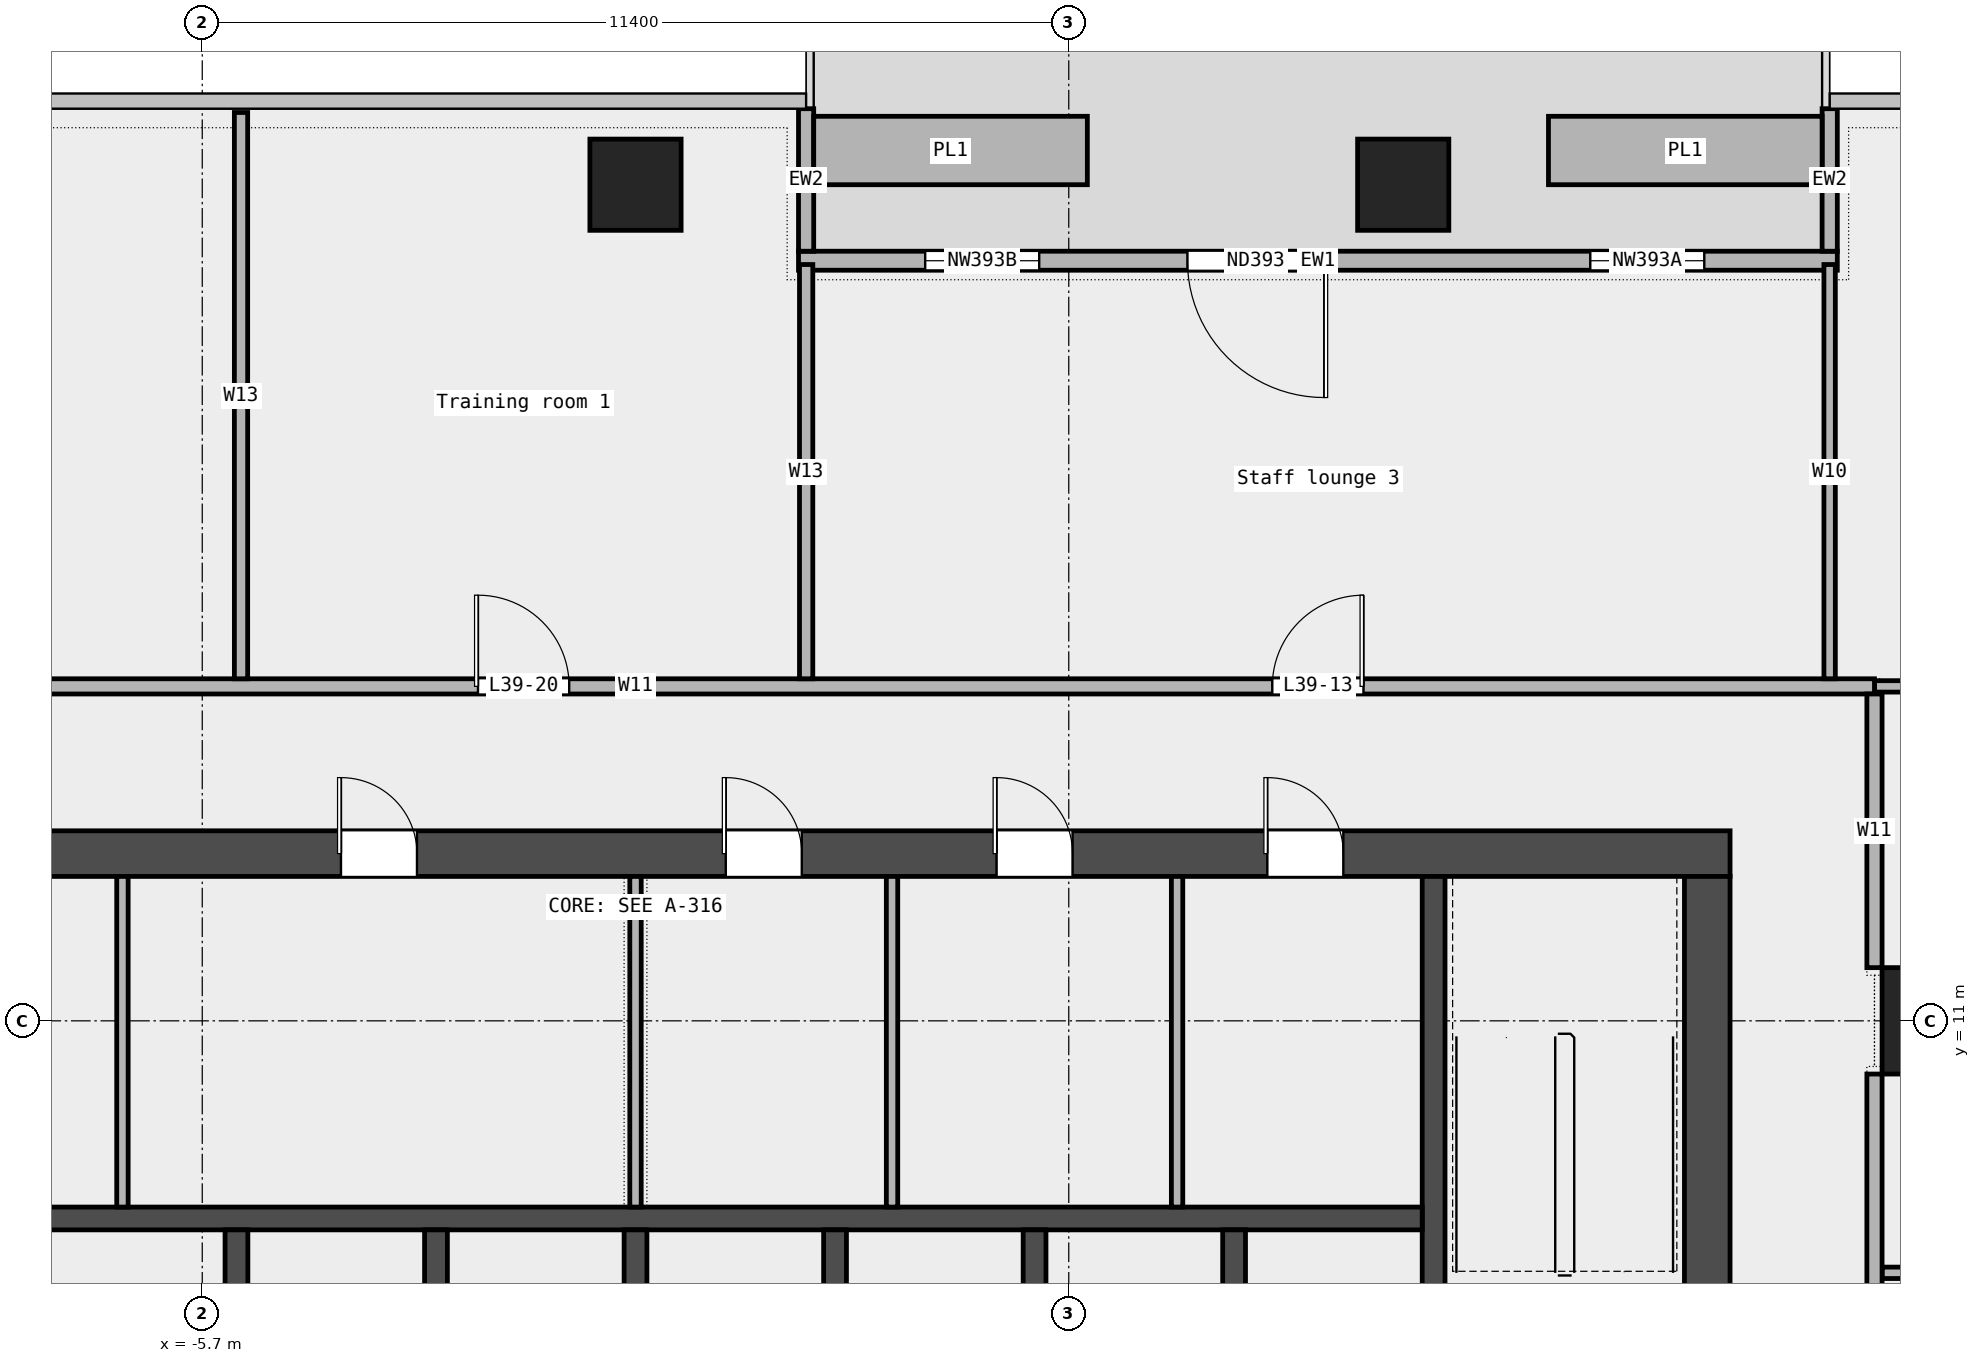
"""IFC4 building model, lengths in metres.
Left out: names, types, materials, properties, quantities, classifications, styles, units other than length and angle.
Written with IfcOpenShell. Run it as: python <this file> out.ifc"""

import sys

from ifc_helpers import new_model, si_unit, direction, frame, frame_2d, origin, origin_2d, place, context, subcontext, project, spatial, rectangle, extrude, element, fill, save


model = new_model("IFC4")
c1 = context("Model", 3, precision=1e-05, world=origin(), true_north=direction((0.0, 1.0)))
c2 = subcontext(c1, "Body", "Model", "MODEL_VIEW")
j1 = project(units=[si_unit("LENGTHUNIT", "METRE"), si_unit("PLANEANGLEUNIT", "RADIAN")], contexts=[c1])
p1 = place(None, origin())
s1 = spatial("IfcSite", under=j1, at=p1, CompositionType="ELEMENT")
p2 = place(p1, origin())
s2 = spatial("IfcBuilding", under=s1, at=p2, CompositionType="ELEMENT")
p3 = place(p2, frame((0.0, 0.0, 189.0)))
s3 = spatial("IfcBuildingStorey", under=s2, at=p3, CompositionType="ELEMENT", Elevation=189.0)
for number, where, z_axis, x_axis in (
    (1, (10.1, 22.0, 0.0), (0.0, 0.0, 1.0), (1.0, 0.0, 0.0)),
    (2, (0.0, 22.0, 0.0), (0.0, 0.0, 1.0), (1.0, 0.0, 0.0)),
):
    element("IfcColumn", number, at=place(p3, frame(where, z_axis=z_axis, x_axis=x_axis)), inside=s3, PredefinedType="COLUMN", context=c2, shape_type="SweptSolid", body=[
        extrude(rectangle(XDim=1.2, YDim=1.2, at=origin_2d()), origin(), (0.0, 0.0, 1.0), 3.6),
    ])
p4 = place(p3, frame((17.1, 11.0, 0.0), z_axis=(0.0, 0.0, 1.0), x_axis=(1.0, 0.0, 0.0)))
e3 = element("IfcColumn", 3, at=p4, inside=s3, PredefinedType="COLUMN", context=c2, shape_type="SweptSolid", body=[
    extrude(rectangle(XDim=1.4, YDim=1.4, at=origin_2d()), origin(), (0.0, 0.0, 1.0), 3.6),
])
p5 = place(p3, frame((15.811, 21.0, 0.0), z_axis=(0.0, 0.0, 1.0), x_axis=(-1.0, 0.0, 0.0)))
e4 = element("IfcWall", 4, at=p5, inside=s3, PredefinedType="STANDARD", context=c2, shape_type="SweptSolid", body=[
    extrude(rectangle(XDim=13.667, YDim=0.25, at=frame_2d((6.833, 0.0))), origin(), (0.0, 0.0, 1.0), 3.6),
])
p6 = place(p5, frame((1.75, 0.0, 0.45)))
e5 = element("IfcOpeningElement", 5, at=p6, cuts=e4, PredefinedType="OPENING", context=c2, shape_type="SweptSolid", body=[
    extrude(rectangle(XDim=1.5, YDim=2.4, at=frame_2d((0.75, 1.2))), frame((0.0, 0.137, 0.0), z_axis=(0.0, -1.0, 0.0), x_axis=(1.0, 0.0, 0.0)), (0.0, 0.0, 1.0), 0.274),
])
p7 = place(p5, frame((6.75, 0.0, 0.0)))
e6 = element("IfcOpeningElement", 6, at=p7, cuts=e4, PredefinedType="OPENING", context=c2, shape_type="SweptSolid", body=[
    extrude(rectangle(XDim=1.8, YDim=2.4, at=frame_2d((0.9, 1.2))), frame((0.0, 0.137, 0.0), z_axis=(0.0, -1.0, 0.0), x_axis=(1.0, 0.0, 0.0)), (0.0, 0.0, 1.0), 0.274),
])
p8 = place(p5, frame((10.5, 0.0, 0.45)))
e7 = element("IfcOpeningElement", 7, at=p8, cuts=e4, PredefinedType="OPENING", context=c2, shape_type="SweptSolid", body=[
    extrude(rectangle(XDim=1.5, YDim=2.4, at=frame_2d((0.75, 1.2))), frame((0.0, 0.137, 0.0), z_axis=(0.0, -1.0, 0.0), x_axis=(1.0, 0.0, 0.0)), (0.0, 0.0, 1.0), 0.274),
])
for number, where, z_axis, x_axis in (
    (8, (15.711, 23.0, 0.0), (0.0, 0.0, 1.0), (0.0, -1.0, 0.0)),
    (9, (2.244, 23.0, 0.0), (0.0, 0.0, 1.0), (0.0, -1.0, 0.0)),
):
    element("IfcWall", number, at=place(p3, frame(where, z_axis=z_axis, x_axis=x_axis)), inside=s3, PredefinedType="STANDARD", context=c2, shape_type="SweptSolid", body=[
        extrude(rectangle(XDim=1.875, YDim=0.2, at=frame_2d((0.938, 0.0))), origin(), (0.0, 0.0, 1.0), 3.6),
    ])
for number, where, z_axis, x_axis in (
    (10, (15.611, 22.45, 0.0), (0.0, 0.0, 1.0), (-1.0, 0.0, 0.0)),
    (11, (5.944, 22.45, 0.0), (0.0, 0.0, 1.0), (-1.0, 0.0, 0.0)),
):
    element("IfcWall", number, at=place(p3, frame(where, z_axis=z_axis, x_axis=x_axis)), inside=s3, PredefinedType="STANDARD", context=c2, shape_type="SweptSolid", body=[
        extrude(rectangle(XDim=3.6, YDim=0.9, at=frame_2d((1.8, 0.0))), origin(), (0.0, 0.0, 1.0), 0.7),
    ])
p9 = place(p3, frame((16.4, 7.685, 0.0), z_axis=(0.0, 0.0, 1.0), x_axis=(1.0, 0.0, 0.0)))
e12 = element("IfcWall", 12, at=p9, inside=s3, PredefinedType="PARTITIONING", context=c2, shape_type="SweptSolid", body=[
    extrude(rectangle(XDim=3.4, YDim=0.15, at=frame_2d((1.7, 0.0))), origin(), (0.0, 0.0, 1.0), 3.6),
])
p10 = place(p3, frame((16.3, 15.4, 0.0), z_axis=(0.0, 0.0, 1.0), x_axis=(1.0, 0.0, 0.0)))
e13 = element("IfcWall", 13, at=p10, inside=s3, PredefinedType="PARTITIONING", context=c2, shape_type="SweptSolid", body=[
    extrude(rectangle(XDim=3.6, YDim=0.15, at=frame_2d((1.8, 0.0))), origin(), (0.0, 0.0, 1.0), 3.6),
])
p11 = place(p3, frame((-16.3, 15.4, 0.0), z_axis=(0.0, 0.0, 1.0), x_axis=(1.0, 0.0, 0.0)))
e14 = element("IfcWall", 14, at=p11, inside=s3, PredefinedType="PARTITIONING", context=c2, shape_type="SweptSolid", body=[
    extrude(rectangle(XDim=32.6, YDim=0.2, at=frame_2d((16.3, 0.0))), origin(), (0.0, 0.0, 1.0), 3.6),
])
p12 = place(p11, frame((24.677, 0.0, 0.0)))
e15 = element("IfcOpeningElement", 15, at=p12, cuts=e14, PredefinedType="OPENING", context=c2, shape_type="SweptSolid", body=[
    extrude(rectangle(XDim=1.2, YDim=2.1, at=frame_2d((0.6, 1.05))), frame((0.0, 0.112, 0.0), z_axis=(0.0, -1.0, 0.0), x_axis=(1.0, 0.0, 0.0)), (0.0, 0.0, 1.0), 0.224),
])
p13 = place(p11, frame((4.805, 0.0, 0.0)))
e16 = element("IfcOpeningElement", 16, at=p13, cuts=e14, PredefinedType="OPENING", context=c2, shape_type="SweptSolid", body=[
    extrude(rectangle(XDim=1.5, YDim=2.1, at=frame_2d((0.75, 1.05))), frame((0.0, 0.112, 0.0), z_axis=(0.0, -1.0, 0.0), x_axis=(1.0, 0.0, 0.0)), (0.0, 0.0, 1.0), 0.224),
])
p14 = place(p11, frame((14.228, 0.0, 0.0)))
e17 = element("IfcOpeningElement", 17, at=p14, cuts=e14, PredefinedType="OPENING", context=c2, shape_type="SweptSolid", body=[
    extrude(rectangle(XDim=1.2, YDim=2.1, at=frame_2d((0.6, 1.05))), frame((0.0, 0.112, 0.0), z_axis=(0.0, -1.0, 0.0), x_axis=(1.0, 0.0, 0.0)), (0.0, 0.0, 1.0), 0.224),
])
p15 = place(p3, frame((-5.19, 15.5, 0.0), z_axis=(0.0, 0.0, 1.0), x_axis=(0.0, 1.0, 0.0)))
e18 = element("IfcWall", 18, at=p15, inside=s3, PredefinedType="PARTITIONING", context=c2, shape_type="SweptSolid", body=[
    extrude(rectangle(XDim=7.45, YDim=0.175, at=frame_2d((3.725, 0.0))), origin(), (0.0, 0.0, 1.0), 3.6),
])
p16 = place(p3, frame((2.245, 15.5, 0.0), z_axis=(0.0, 0.0, 1.0), x_axis=(0.0, 1.0, 0.0)))
e19 = element("IfcWall", 19, at=p16, inside=s3, PredefinedType="PARTITIONING", context=c2, shape_type="SweptSolid", body=[
    extrude(rectangle(XDim=5.45, YDim=0.175, at=frame_2d((2.725, 0.0))), origin(), (0.0, 0.0, 1.0), 3.6),
])
p17 = place(p3, frame((15.71, 15.5, 0.0), z_axis=(0.0, 0.0, 1.0), x_axis=(0.0, 1.0, 0.0)))
e20 = element("IfcWall", 20, at=p17, inside=s3, PredefinedType="PARTITIONING", context=c2, shape_type="SweptSolid", body=[
    extrude(rectangle(XDim=5.45, YDim=0.15, at=frame_2d((2.725, 0.0))), origin(), (0.0, 0.0, 1.0), 3.6),
])
p18 = place(p3, frame((16.3, 2.95, 0.0), z_axis=(0.0, 0.0, 1.0), x_axis=(0.0, 1.0, 0.0)))
e21 = element("IfcWall", 21, at=p18, inside=s3, PredefinedType="PARTITIONING", context=c2, shape_type="SweptSolid", body=[
    extrude(rectangle(XDim=7.35, YDim=0.2, at=frame_2d((3.675, 0.0))), origin(), (0.0, 0.0, 1.0), 3.6),
])
p19 = place(p3, frame((16.3, 11.7, 0.0), z_axis=(0.0, 0.0, 1.0), x_axis=(0.0, 1.0, 0.0)))
e22 = element("IfcWall", 22, at=p19, inside=s3, PredefinedType="PARTITIONING", context=c2, shape_type="SweptSolid", body=[
    extrude(rectangle(XDim=3.6, YDim=0.2, at=frame_2d((1.8, 0.0))), origin(), (0.0, 0.0, 1.0), 3.6),
])
p20 = place(p3, frame((-14.4, 13.2, 0.0), z_axis=(0.0, 0.0, 1.0), x_axis=(1.0, 0.0, 0.0)))
e23 = element("IfcWall", 23, at=p20, inside=s3, PredefinedType="SHEAR", context=c2, shape_type="SweptSolid", body=[
    extrude(rectangle(XDim=28.8, YDim=0.6, at=frame_2d((14.4, 0.0))), origin(), (0.0, 0.0, 1.0), 3.7),
])
p21 = place(p20, frame((5.275, 0.0, 0.0)))
e24 = element("IfcOpeningElement", 24, at=p21, cuts=e23, PredefinedType="OPENING", context=c2, shape_type="SweptSolid", body=[
    extrude(rectangle(XDim=1.0, YDim=2.1, at=frame_2d((0.5, 1.05))), frame((0.0, 0.312, 0.0), z_axis=(0.0, -1.0, 0.0), x_axis=(1.0, 0.0, 0.0)), (0.0, 0.0, 1.0), 0.624),
])
p22 = place(p20, frame((10.525, 0.0, 0.0)))
e25 = element("IfcOpeningElement", 25, at=p22, cuts=e23, PredefinedType="OPENING", context=c2, shape_type="SweptSolid", body=[
    extrude(rectangle(XDim=1.0, YDim=2.1, at=frame_2d((0.5, 1.05))), frame((0.0, 0.312, 0.0), z_axis=(0.0, -1.0, 0.0), x_axis=(1.0, 0.0, 0.0)), (0.0, 0.0, 1.0), 0.624),
])
p23 = place(p20, frame((15.587, 0.0, 0.0)))
e26 = element("IfcOpeningElement", 26, at=p23, cuts=e23, PredefinedType="OPENING", context=c2, shape_type="SweptSolid", body=[
    extrude(rectangle(XDim=1.0, YDim=2.1, at=frame_2d((0.5, 1.05))), frame((0.0, 0.312, 0.0), z_axis=(0.0, -1.0, 0.0), x_axis=(1.0, 0.0, 0.0)), (0.0, 0.0, 1.0), 0.624),
])
p24 = place(p20, frame((19.15, 0.0, 0.0)))
e27 = element("IfcOpeningElement", 27, at=p24, cuts=e23, PredefinedType="OPENING", context=c2, shape_type="SweptSolid", body=[
    extrude(rectangle(XDim=1.0, YDim=2.1, at=frame_2d((0.5, 1.05))), frame((0.0, 0.312, 0.0), z_axis=(0.0, -1.0, 0.0), x_axis=(1.0, 0.0, 0.0)), (0.0, 0.0, 1.0), 0.624),
])
p25 = place(p20, frame((22.712, 0.0, 0.0)))
e28 = element("IfcOpeningElement", 28, at=p25, cuts=e23, PredefinedType="OPENING", context=c2, shape_type="SweptSolid", body=[
    extrude(rectangle(XDim=1.0, YDim=2.1, at=frame_2d((0.5, 1.05))), frame((0.0, 0.312, 0.0), z_axis=(0.0, -1.0, 0.0), x_axis=(1.0, 0.0, 0.0)), (0.0, 0.0, 1.0), 0.624),
])
p26 = place(p3, frame((14.1, -6.6, 0.0), z_axis=(0.0, 0.0, 1.0), x_axis=(0.0, 1.0, 0.0)))
e29 = element("IfcWall", 29, at=p26, inside=s3, PredefinedType="SHEAR", context=c2, shape_type="SweptSolid", body=[
    extrude(rectangle(XDim=19.5, YDim=0.6, at=frame_2d((9.75, 0.0))), origin(), (0.0, 0.0, 1.0), 3.7),
])
p27 = place(p26, frame((9.3, 0.0, 0.0)))
e30 = element("IfcOpeningElement", 30, at=p27, cuts=e29, PredefinedType="OPENING", context=c2, shape_type="SweptSolid", body=[
    extrude(rectangle(XDim=1.8, YDim=2.1, at=frame_2d((0.9, 1.05))), frame((0.0, 0.312, 0.0), z_axis=(0.0, -1.0, 0.0), x_axis=(1.0, 0.0, 0.0)), (0.0, 0.0, 1.0), 0.624),
])
p28 = place(p3, frame((10.5, 5.25, 0.0), z_axis=(0.0, 0.0, 1.0), x_axis=(0.0, 1.0, 0.0)))
e31 = element("IfcWall", 31, at=p28, inside=s3, PredefinedType="SHEAR", context=c2, shape_type="SweptSolid", body=[
    extrude(rectangle(XDim=7.65, YDim=0.3, at=frame_2d((3.825, 0.0))), origin(), (0.0, 0.0, 1.0), 3.7),
])
p29 = place(p3, frame((-10.35, 8.4, 0.0), z_axis=(0.0, 0.0, 1.0), x_axis=(1.0, 0.0, 0.0)))
e32 = element("IfcWall", 32, at=p29, inside=s3, PredefinedType="SOLIDWALL", context=c2, shape_type="SweptSolid", body=[
    extrude(rectangle(XDim=20.7, YDim=0.3, at=frame_2d((10.35, 0.0))), origin(), (0.0, 0.0, 1.0), 3.7),
])
for number, where, z_axis, x_axis in (
    (33, (-5.25, 5.55, 0.0), (0.0, 0.0, 1.0), (0.0, 1.0, 0.0)),
    (34, (-2.625, 5.55, 0.0), (0.0, 0.0, 1.0), (0.0, 1.0, 0.0)),
    (35, (0.0, 5.55, 0.0), (0.0, 0.0, 1.0), (0.0, 1.0, 0.0)),
    (36, (2.625, 5.55, 0.0), (0.0, 0.0, 1.0), (0.0, 1.0, 0.0)),
    (37, (5.25, 5.55, 0.0), (0.0, 0.0, 1.0), (0.0, 1.0, 0.0)),
    (38, (7.875, 5.55, 0.0), (0.0, 0.0, 1.0), (0.0, 1.0, 0.0)),
):
    element("IfcWall", number, at=place(p3, frame(where, z_axis=z_axis, x_axis=x_axis)), inside=s3, PredefinedType="SOLIDWALL", context=c2, shape_type="SweptSolid", body=[
        extrude(rectangle(XDim=2.7, YDim=0.3, at=frame_2d((1.35, 0.0))), origin(), (0.0, 0.0, 1.0), 3.7),
    ])
for number, where, z_axis, x_axis in (
    (39, (-6.75, 8.55, 0.0), (0.0, 0.0, 1.0), (0.0, 1.0, 0.0)),
    (40, (0.0, 8.55, 0.0), (0.0, 0.0, 1.0), (0.0, 1.0, 0.0)),
    (41, (3.375, 8.55, 0.0), (0.0, 0.0, 1.0), (0.0, 1.0, 0.0)),
    (42, (7.125, 8.55, 0.0), (0.0, 0.0, 1.0), (0.0, 1.0, 0.0)),
):
    element("IfcWall", number, at=place(p3, frame(where, z_axis=z_axis, x_axis=x_axis)), inside=s3, PredefinedType="PARTITIONING", context=c2, shape_type="SweptSolid", body=[
        extrude(rectangle(XDim=4.35, YDim=0.15, at=frame_2d((2.175, 0.0))), origin(), (0.0, 0.0, 1.0), 3.7),
    ])
p30 = place(p6, origin())
e43 = element("IfcWindow", 43, at=p30, inside=s3, PartitioningType="SINGLE_PANEL", PredefinedType="WINDOW", context=c2, shape_type="SweptSolid", body=[
    extrude(rectangle(XDim=1.5, YDim=2.4, at=frame_2d((0.75, 1.2))), frame((0.0, 0.03, 0.0), z_axis=(0.0, -1.0, 0.0), x_axis=(1.0, 0.0, 0.0)), (0.0, 0.0, 1.0), 0.06),
])
fill(e5, e43)
p31 = place(p7, origin())
e44 = element("IfcDoor", 44, at=p31, inside=s3, OperationType="DOUBLE_DOOR_SINGLE_SWING", PredefinedType="DOOR", context=c2, shape_type="SweptSolid", body=[
    extrude(rectangle(XDim=1.8, YDim=2.4, at=frame_2d((0.9, 1.2))), frame((0.0, 0.025, 0.0), z_axis=(0.0, -1.0, 0.0), x_axis=(1.0, 0.0, 0.0)), (0.0, 0.0, 1.0), 0.05),
])
fill(e6, e44)
p32 = place(p8, origin())
e45 = element("IfcWindow", 45, at=p32, inside=s3, PartitioningType="SINGLE_PANEL", PredefinedType="WINDOW", context=c2, shape_type="SweptSolid", body=[
    extrude(rectangle(XDim=1.5, YDim=2.4, at=frame_2d((0.75, 1.2))), frame((0.0, 0.03, 0.0), z_axis=(0.0, -1.0, 0.0), x_axis=(1.0, 0.0, 0.0)), (0.0, 0.0, 1.0), 0.06),
])
fill(e7, e45)
p33 = place(p12, origin())
e46 = element("IfcDoor", 46, at=p33, inside=s3, OperationType="SINGLE_SWING_RIGHT", PredefinedType="DOOR", context=c2, shape_type="SweptSolid", body=[
    extrude(rectangle(XDim=1.2, YDim=2.1, at=frame_2d((0.6, 1.05))), frame((0.0, 0.025, 0.0), z_axis=(0.0, -1.0, 0.0), x_axis=(1.0, 0.0, 0.0)), (0.0, 0.0, 1.0), 0.05),
])
fill(e15, e46)
p34 = place(p14, origin())
e47 = element("IfcDoor", 47, at=p34, inside=s3, OperationType="SINGLE_SWING_LEFT", PredefinedType="DOOR", context=c2, shape_type="SweptSolid", body=[
    extrude(rectangle(XDim=1.2, YDim=2.1, at=frame_2d((0.6, 1.05))), frame((0.0, 0.025, 0.0), z_axis=(0.0, -1.0, 0.0), x_axis=(1.0, 0.0, 0.0)), (0.0, 0.0, 1.0), 0.05),
])
fill(e17, e47)
p35 = place(p22, origin())
e48 = element("IfcDoor", 48, at=p35, inside=s3, OperationType="SINGLE_SWING_LEFT", PredefinedType="DOOR", context=c2, shape_type="SweptSolid", body=[
    extrude(rectangle(XDim=1.0, YDim=2.1, at=frame_2d((0.5, 1.05))), frame((0.0, 0.025, 0.0), z_axis=(0.0, -1.0, 0.0), x_axis=(1.0, 0.0, 0.0)), (0.0, 0.0, 1.0), 0.05),
])
fill(e25, e48)
p36 = place(p23, origin())
e49 = element("IfcDoor", 49, at=p36, inside=s3, OperationType="SINGLE_SWING_LEFT", PredefinedType="DOOR", context=c2, shape_type="SweptSolid", body=[
    extrude(rectangle(XDim=1.0, YDim=2.1, at=frame_2d((0.5, 1.05))), frame((0.0, 0.025, 0.0), z_axis=(0.0, -1.0, 0.0), x_axis=(1.0, 0.0, 0.0)), (0.0, 0.0, 1.0), 0.05),
])
fill(e26, e49)
p37 = place(p24, origin())
e50 = element("IfcDoor", 50, at=p37, inside=s3, OperationType="SINGLE_SWING_LEFT", PredefinedType="DOOR", context=c2, shape_type="SweptSolid", body=[
    extrude(rectangle(XDim=1.0, YDim=2.1, at=frame_2d((0.5, 1.05))), frame((0.0, 0.025, 0.0), z_axis=(0.0, -1.0, 0.0), x_axis=(1.0, 0.0, 0.0)), (0.0, 0.0, 1.0), 0.05),
])
fill(e27, e50)
p38 = place(p25, origin())
e51 = element("IfcDoor", 51, at=p38, inside=s3, OperationType="SINGLE_SWING_LEFT", PredefinedType="DOOR", context=c2, shape_type="SweptSolid", body=[
    extrude(rectangle(XDim=1.0, YDim=2.1, at=frame_2d((0.5, 1.05))), frame((0.0, 0.025, 0.0), z_axis=(0.0, -1.0, 0.0), x_axis=(1.0, 0.0, 0.0)), (0.0, 0.0, 1.0), 0.05),
])
fill(e28, e51)
save(model, sys.argv[1])
